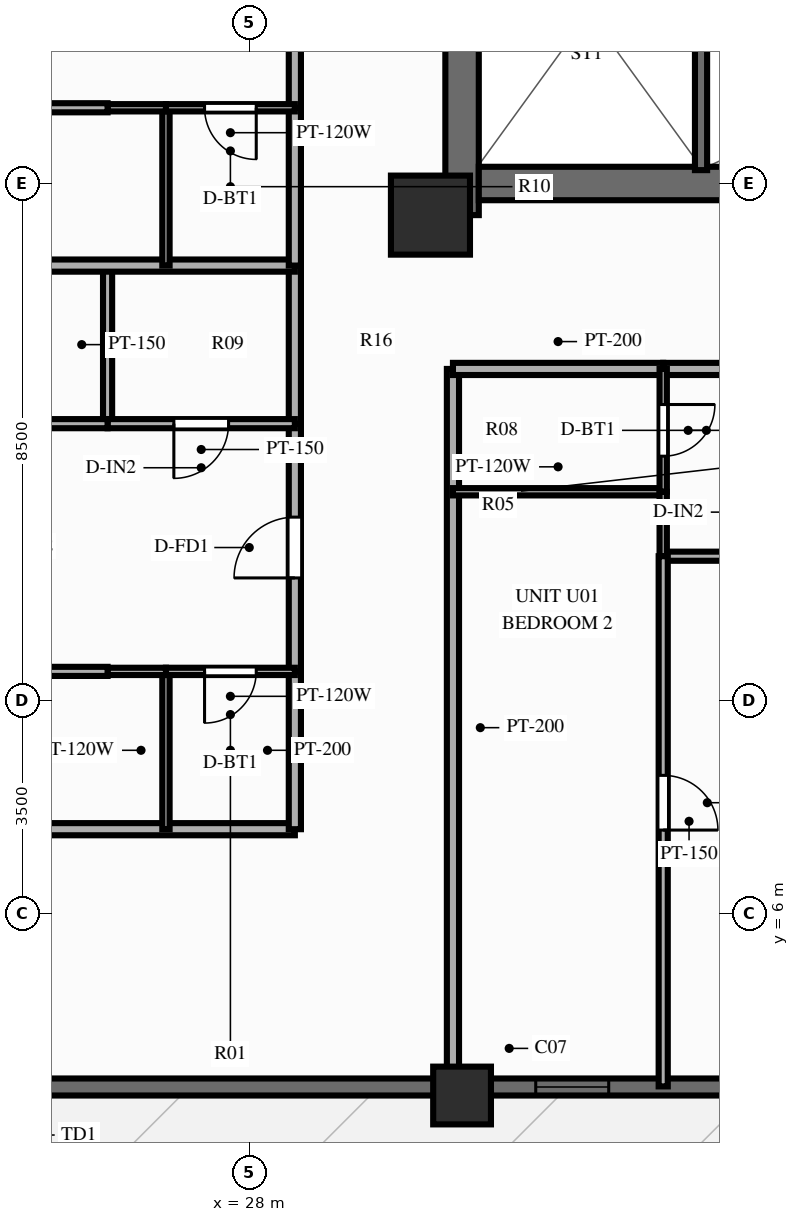
"""IFC4 building model, lengths in metres.
Left out: names, types, materials, properties, quantities, classifications, styles, units other than length and angle.
Written with IfcOpenShell. Run it as: python <this file> out.ifc"""

import sys

from ifc_helpers import new_model, si_unit, direction, frame, frame_2d, origin, origin_2d, place, context, subcontext, project, spatial, rectangle, extrude, source, transform, mapped, element, fill, save


model = new_model("IFC4")
c1 = context("Model", 3, precision=1e-05, world=origin(), true_north=direction((0.0, 1.0)))
c2 = subcontext(c1, "Body", "Model", "MODEL_VIEW")
j1 = project(units=[si_unit("LENGTHUNIT", "METRE"), si_unit("PLANEANGLEUNIT", "RADIAN")], contexts=[c1])
p1 = place(None, origin())
s1 = spatial("IfcSite", under=j1, at=p1, CompositionType="ELEMENT")
p2 = place(p1, origin())
s2 = spatial("IfcBuilding", under=s1, at=p2, CompositionType="ELEMENT")
p3 = place(p2, frame((0.0, 0.0, 116.85)))
s3 = spatial("IfcBuildingStorey", under=s2, at=p3, CompositionType="ELEMENT", Elevation=116.85)
p4 = place(p3, frame((31.5, 17.48, 0.0), z_axis=(0.0, 0.0, 1.0), x_axis=(0.0, 1.0, 0.0)))
e1 = element("IfcWall", 1, at=p4, inside=s3, PredefinedType="SHEAR", context=c2, shape_type="SweptSolid", body=[
    extrude(rectangle(XDim=19.04, YDim=0.55, at=frame_2d((9.52, 0.0))), origin(), (0.0, 0.0, 1.0), 3.0),
])
p5 = place(p4, frame((6.32, 0.0, 0.0)))
e2 = element("IfcOpeningElement", 2, at=p5, cuts=e1, PredefinedType="OPENING", context=c2, shape_type="SweptSolid", body=[
    extrude(rectangle(XDim=1.1, YDim=2.15, at=frame_2d((0.55, 1.075))), frame((0.0, 0.287, 0.0), z_axis=(0.0, -1.0, 0.0), x_axis=(1.0, 0.0, 0.0)), (0.0, 0.0, 1.0), 0.574),
])
p6 = place(p3, frame((31.775, 18.0, 0.0), z_axis=(0.0, 0.0, 1.0), x_axis=(1.0, 0.0, 0.0)))
e3 = element("IfcWall", 3, at=p6, inside=s3, PredefinedType="SHEAR", context=c2, shape_type="SweptSolid", body=[
    extrude(rectangle(XDim=12.45, YDim=0.55, at=frame_2d((6.225, 0.0))), origin(), (0.0, 0.0, 1.0), 3.0),
])
m1 = source(origin(), c2, "Body", "SweptSolid", [
    extrude(rectangle(XDim=1.3, YDim=1.3, at=origin_2d()), origin(), (0.0, 0.0, 1.0), 3.0),
])
p7 = place(p3, frame((30.98, 17.48, 0.0), z_axis=(0.0, 0.0, 1.0), x_axis=(1.0, 0.0, 0.0)))
e4 = element("IfcColumn", 4, at=p7, inside=s3, PredefinedType="COLUMN", context=c2, shape_type="MappedRepresentation", body=[
    mapped(m1, transform((0.0, 0.0, 0.0), scale=1.0)),
])
m2 = source(origin(), c2, "Body", "SweptSolid", [
    extrude(rectangle(XDim=0.95, YDim=0.95, at=origin_2d()), origin(), (0.0, 0.0, 1.0), 3.0),
])
p8 = place(p3, frame((31.5, 3.0, 0.0), z_axis=(0.0, 0.0, 1.0), x_axis=(1.0, 0.0, 0.0)))
e5 = element("IfcColumn", 5, at=p8, inside=s3, PredefinedType="COLUMN", context=c2, shape_type="MappedRepresentation", body=[
    mapped(m2, transform((0.0, 0.0, 0.0), scale=1.0)),
])
p9 = place(p3, frame((16.2, 3.14, 0.0), z_axis=(0.0, 0.0, 1.0), x_axis=(1.0, 0.0, 0.0)))
e6 = element("IfcWall", 6, at=p9, inside=s3, PredefinedType="SOLIDWALL", context=c2, shape_type="SweptSolid", body=[
    extrude(rectangle(XDim=43.6, YDim=0.28, at=frame_2d((21.8, 0.0))), origin(), (0.0, 0.0, 1.0), 2.28),
])
p10 = place(p9, frame((8.2, 0.0, 0.0), z_axis=(0.0, 0.0, 1.0), x_axis=(-1.0, 0.0, 0.0)))
e7 = element("IfcOpeningElement", 7, at=p10, cuts=e6, PredefinedType="OPENING", context=c2, shape_type="SweptSolid", body=[
    extrude(rectangle(XDim=1.1, YDim=2.15, at=frame_2d((0.55, 1.075))), frame((0.0, 0.152, 0.0), z_axis=(0.0, -1.0, 0.0), x_axis=(1.0, 0.0, 0.0)), (0.0, 0.0, 1.0), 0.304),
])
p11 = place(p9, frame((16.511, 0.0, 0.25)))
e8 = element("IfcOpeningElement", 8, at=p11, cuts=e6, PredefinedType="OPENING", context=c2, shape_type="SweptSolid", body=[
    extrude(rectangle(XDim=1.2, YDim=1.5, at=frame_2d((0.6, 0.75))), frame((0.0, 0.152, 0.0), z_axis=(0.0, -1.0, 0.0), x_axis=(1.0, 0.0, 0.0)), (0.0, 0.0, 1.0), 0.304),
])
p12 = place(p9, frame((21.065, 0.0, 0.25)))
e9 = element("IfcOpeningElement", 9, at=p12, cuts=e6, PredefinedType="OPENING", context=c2, shape_type="SweptSolid", body=[
    extrude(rectangle(XDim=1.2, YDim=1.5, at=frame_2d((0.6, 0.75))), frame((0.0, 0.152, 0.0), z_axis=(0.0, -1.0, 0.0), x_axis=(1.0, 0.0, 0.0)), (0.0, 0.0, 1.0), 0.304),
])
p13 = place(p9, frame((25.754, 0.0, 0.25)))
e10 = element("IfcOpeningElement", 10, at=p13, cuts=e6, PredefinedType="OPENING", context=c2, shape_type="SweptSolid", body=[
    extrude(rectangle(XDim=1.2, YDim=1.5, at=frame_2d((0.6, 0.75))), frame((0.0, 0.152, 0.0), z_axis=(0.0, -1.0, 0.0), x_axis=(1.0, 0.0, 0.0)), (0.0, 0.0, 1.0), 0.304),
])
p14 = place(p9, frame((35.35, 0.0, 0.25)))
e11 = element("IfcOpeningElement", 11, at=p14, cuts=e6, PredefinedType="OPENING", context=c2, shape_type="SweptSolid", body=[
    extrude(rectangle(XDim=1.2, YDim=1.5, at=frame_2d((0.6, 0.75))), frame((0.0, 0.152, 0.0), z_axis=(0.0, -1.0, 0.0), x_axis=(1.0, 0.0, 0.0)), (0.0, 0.0, 1.0), 0.304),
])
p15 = place(p3, frame((35.43, 18.22, 0.0), z_axis=(0.0, 0.0, 1.0), x_axis=(0.0, 1.0, 0.0)))
e12 = element("IfcWall", 12, at=p15, inside=s3, PredefinedType="SOLIDWALL", context=c2, shape_type="SweptSolid", body=[
    extrude(rectangle(XDim=7.22, YDim=0.2, at=frame_2d((3.61, 0.0))), origin(), (0.0, 0.0, 1.0), 2.79),
])
p16 = place(p15, frame((6.68, 0.0, 0.0), z_axis=(0.0, 0.0, 1.0), x_axis=(-1.0, 0.0, 0.0)))
e13 = element("IfcOpeningElement", 13, at=p16, cuts=e12, PredefinedType="OPENING", context=c2, shape_type="SweptSolid", body=[
    extrude(rectangle(XDim=1.1, YDim=2.15, at=frame_2d((0.55, 1.075))), frame((0.0, 0.112, 0.0), z_axis=(0.0, -1.0, 0.0), x_axis=(1.0, 0.0, 0.0)), (0.0, 0.0, 1.0), 0.224),
])
p17 = place(p3, frame((31.35, 14.95, 0.0), z_axis=(0.0, 0.0, 1.0), x_axis=(0.0, -1.0, 0.0)))
e14 = element("IfcWall", 14, at=p17, inside=s3, PredefinedType="PARTITIONING", context=c2, shape_type="SweptSolid", body=[
    extrude(rectangle(XDim=11.8, YDim=0.2, at=frame_2d((5.9, 0.0))), origin(), (0.0, 0.0, 1.0), 2.34),
])
p18 = place(p3, frame((31.35, 14.95, 0.0), z_axis=(0.0, 0.0, 1.0), x_axis=(1.0, 0.0, 0.0)))
e15 = element("IfcWall", 15, at=p18, inside=s3, PredefinedType="PARTITIONING", context=c2, shape_type="SweptSolid", body=[
    extrude(rectangle(XDim=3.458, YDim=0.2, at=frame_2d((1.729, 0.0))), origin(), (0.0, 0.0, 1.0), 2.79),
])
p19 = place(p3, frame((34.808, 14.95, 0.0), z_axis=(0.0, 0.0, 1.0), x_axis=(1.0, 0.0, 0.0)))
e16 = element("IfcWall", 16, at=p19, inside=s3, PredefinedType="PARTITIONING", context=c2, shape_type="SweptSolid", body=[
    extrude(rectangle(XDim=3.465, YDim=0.2, at=frame_2d((1.732, 0.0))), origin(), (0.0, 0.0, 1.0), 2.79),
])
p20 = place(p19, frame((1.232, 0.0, 0.0)))
e17 = element("IfcOpeningElement", 17, at=p20, cuts=e16, PredefinedType="OPENING", context=c2, shape_type="SweptSolid", body=[
    extrude(rectangle(XDim=1.0, YDim=2.15, at=frame_2d((0.5, 1.075))), frame((0.0, 0.112, 0.0), z_axis=(0.0, -1.0, 0.0), x_axis=(1.0, 0.0, 0.0)), (0.0, 0.0, 1.0), 0.224),
])
p21 = place(p3, frame((34.808, 11.87, 0.0), z_axis=(0.0, 0.0, 1.0), x_axis=(1.0, 0.0, 0.0)))
e18 = element("IfcWall", 18, at=p21, inside=s3, PredefinedType="PARTITIONING", context=c2, shape_type="SweptSolid", body=[
    extrude(rectangle(XDim=3.465, YDim=0.15, at=frame_2d((1.732, 0.0))), origin(), (0.0, 0.0, 1.0), 2.79),
])
p22 = place(p21, frame((1.282, 0.0, 0.0)))
e19 = element("IfcOpeningElement", 19, at=p22, cuts=e18, PredefinedType="OPENING", context=c2, shape_type="SweptSolid", body=[
    extrude(rectangle(XDim=0.9, YDim=2.1, at=frame_2d((0.45, 1.05))), frame((0.0, 0.087, 0.0), z_axis=(0.0, -1.0, 0.0), x_axis=(1.0, 0.0, 0.0)), (0.0, 0.0, 1.0), 0.174),
])
p23 = place(p3, frame((31.35, 12.93, 0.0), z_axis=(0.0, 0.0, 1.0), x_axis=(1.0, 0.0, 0.0)))
e20 = element("IfcWall", 20, at=p23, inside=s3, PredefinedType="PARTITIONING", context=c2, shape_type="SweptSolid", body=[
    extrude(rectangle(XDim=3.458, YDim=0.12, at=frame_2d((1.729, 0.0))), origin(), (0.0, 0.0, 1.0), 2.79),
])
p24 = place(p3, frame((34.808, 14.95, 0.0), z_axis=(0.0, 0.0, 1.0), x_axis=(0.0, -1.0, 0.0)))
e21 = element("IfcWall", 21, at=p24, inside=s3, PredefinedType="PARTITIONING", context=c2, shape_type="SweptSolid", body=[
    extrude(rectangle(XDim=2.02, YDim=0.12, at=frame_2d((1.01, 0.0))), origin(), (0.0, 0.0, 1.0), 2.79),
])
p25 = place(p24, frame((0.585, 0.0, 0.0)))
e22 = element("IfcOpeningElement", 22, at=p25, cuts=e21, PredefinedType="OPENING", context=c2, shape_type="SweptSolid", body=[
    extrude(rectangle(XDim=0.85, YDim=2.05, at=frame_2d((0.425, 1.025))), frame((0.0, 0.072, 0.0), z_axis=(0.0, -1.0, 0.0), x_axis=(1.0, 0.0, 0.0)), (0.0, 0.0, 1.0), 0.144),
])
p26 = place(p3, frame((34.808, 12.93, 0.0), z_axis=(0.0, 0.0, 1.0), x_axis=(0.0, -1.0, 0.0)))
e23 = element("IfcWall", 23, at=p26, inside=s3, PredefinedType="PARTITIONING", context=c2, shape_type="SweptSolid", body=[
    extrude(rectangle(XDim=1.06, YDim=0.12, at=frame_2d((0.53, 0.0))), origin(), (0.0, 0.0, 1.0), 2.79),
])
p27 = place(p3, frame((34.808, 11.87, 0.0), z_axis=(0.0, 0.0, 1.0), x_axis=(0.0, -1.0, 0.0)))
e24 = element("IfcWall", 24, at=p27, inside=s3, PredefinedType="PARTITIONING", context=c2, shape_type="SweptSolid", body=[
    extrude(rectangle(XDim=8.72, YDim=0.15, at=frame_2d((4.36, 0.0))), origin(), (0.0, 0.0, 1.0), 2.79),
])
p28 = place(p27, frame((3.604, 0.0, 0.0)))
e25 = element("IfcOpeningElement", 25, at=p28, cuts=e24, PredefinedType="OPENING", context=c2, shape_type="SweptSolid", body=[
    extrude(rectangle(XDim=0.9, YDim=2.1, at=frame_2d((0.45, 1.05))), frame((0.0, 0.087, 0.0), z_axis=(0.0, -1.0, 0.0), x_axis=(1.0, 0.0, 0.0)), (0.0, 0.0, 1.0), 0.174),
])
p29 = place(p3, frame((28.75, 7.38, 0.0), z_axis=(0.0, 0.0, 1.0), x_axis=(-1.0, 0.0, 0.0)))
e26 = element("IfcWall", 26, at=p29, inside=s3, PredefinedType="PARTITIONING", context=c2, shape_type="SweptSolid", body=[
    extrude(rectangle(XDim=16.6, YDim=0.2, at=frame_2d((8.3, 0.0))), origin(), (0.0, 0.0, 1.0), 2.79),
])
p30 = place(p3, frame((28.75, 7.38, 0.0), z_axis=(0.0, 0.0, 1.0), x_axis=(0.0, 1.0, 0.0)))
e27 = element("IfcWall", 27, at=p30, inside=s3, PredefinedType="PARTITIONING", context=c2, shape_type="SweptSolid", body=[
    extrude(rectangle(XDim=2.596, YDim=0.2, at=frame_2d((1.298, 0.0))), origin(), (0.0, 0.0, 1.0), 2.79),
])
p31 = place(p3, frame((28.75, 9.976, 0.0), z_axis=(0.0, 0.0, 1.0), x_axis=(0.0, 1.0, 0.0)))
e28 = element("IfcWall", 28, at=p31, inside=s3, PredefinedType="PARTITIONING", context=c2, shape_type="SweptSolid", body=[
    extrude(rectangle(XDim=4.074, YDim=0.2, at=frame_2d((2.037, 0.0))), origin(), (0.0, 0.0, 1.0), 2.79),
])
p32 = place(p31, frame((1.537, 0.0, 0.0)))
e29 = element("IfcOpeningElement", 29, at=p32, cuts=e28, PredefinedType="OPENING", context=c2, shape_type="SweptSolid", body=[
    extrude(rectangle(XDim=1.0, YDim=2.15, at=frame_2d((0.5, 1.075))), frame((0.0, 0.112, 0.0), z_axis=(0.0, -1.0, 0.0), x_axis=(1.0, 0.0, 0.0)), (0.0, 0.0, 1.0), 0.224),
])
p33 = place(p3, frame((28.75, 14.05, 0.0), z_axis=(0.0, 0.0, 1.0), x_axis=(0.0, 1.0, 0.0)))
e30 = element("IfcWall", 30, at=p33, inside=s3, PredefinedType="PARTITIONING", context=c2, shape_type="SweptSolid", body=[
    extrude(rectangle(XDim=2.6, YDim=0.2, at=frame_2d((1.3, 0.0))), origin(), (0.0, 0.0, 1.0), 2.79),
])
p34 = place(p3, frame((26.63, 7.38, 0.0), z_axis=(0.0, 0.0, 1.0), x_axis=(0.0, 1.0, 0.0)))
e31 = element("IfcWall", 31, at=p34, inside=s3, PredefinedType="PARTITIONING", context=c2, shape_type="SweptSolid", body=[
    extrude(rectangle(XDim=2.596, YDim=0.12, at=frame_2d((1.298, 0.0))), origin(), (0.0, 0.0, 1.0), 2.79),
])
p35 = place(p3, frame((25.67, 14.05, 0.0), z_axis=(0.0, 0.0, 1.0), x_axis=(0.0, 1.0, 0.0)))
e32 = element("IfcWall", 32, at=p35, inside=s3, PredefinedType="PARTITIONING", context=c2, shape_type="SweptSolid", body=[
    extrude(rectangle(XDim=2.6, YDim=0.15, at=frame_2d((1.3, 0.0))), origin(), (0.0, 0.0, 1.0), 2.79),
])
p36 = place(p3, frame((28.75, 9.976, 0.0), z_axis=(0.0, 0.0, 1.0), x_axis=(-1.0, 0.0, 0.0)))
e33 = element("IfcWall", 33, at=p36, inside=s3, PredefinedType="PARTITIONING", context=c2, shape_type="SweptSolid", body=[
    extrude(rectangle(XDim=2.12, YDim=0.12, at=frame_2d((1.06, 0.0))), origin(), (0.0, 0.0, 1.0), 2.79),
])
p37 = place(p36, frame((0.635, 0.0, 0.0)))
e34 = element("IfcOpeningElement", 34, at=p37, cuts=e33, PredefinedType="OPENING", context=c2, shape_type="SweptSolid", body=[
    extrude(rectangle(XDim=0.85, YDim=2.05, at=frame_2d((0.425, 1.025))), frame((0.0, 0.072, 0.0), z_axis=(0.0, -1.0, 0.0), x_axis=(1.0, 0.0, 0.0)), (0.0, 0.0, 1.0), 0.144),
])
p38 = place(p3, frame((26.63, 9.976, 0.0), z_axis=(0.0, 0.0, 1.0), x_axis=(-1.0, 0.0, 0.0)))
e35 = element("IfcWall", 35, at=p38, inside=s3, PredefinedType="PARTITIONING", context=c2, shape_type="SweptSolid", body=[
    extrude(rectangle(XDim=0.96, YDim=0.12, at=frame_2d((0.48, 0.0))), origin(), (0.0, 0.0, 1.0), 2.79),
])
p39 = place(p3, frame((25.67, 9.976, 0.0), z_axis=(0.0, 0.0, 1.0), x_axis=(-1.0, 0.0, 0.0)))
e36 = element("IfcWall", 36, at=p39, inside=s3, PredefinedType="PARTITIONING", context=c2, shape_type="SweptSolid", body=[
    extrude(rectangle(XDim=13.52, YDim=0.15, at=frame_2d((6.76, 0.0))), origin(), (0.0, 0.0, 1.0), 2.79),
])
p40 = place(p39, frame((5.804, 0.0, 0.0)))
e37 = element("IfcOpeningElement", 37, at=p40, cuts=e36, PredefinedType="OPENING", context=c2, shape_type="SweptSolid", body=[
    extrude(rectangle(XDim=0.9, YDim=2.1, at=frame_2d((0.45, 1.05))), frame((0.0, 0.087, 0.0), z_axis=(0.0, -1.0, 0.0), x_axis=(1.0, 0.0, 0.0)), (0.0, 0.0, 1.0), 0.174),
])
p41 = place(p3, frame((28.75, 14.05, 0.0), z_axis=(0.0, 0.0, 1.0), x_axis=(-1.0, 0.0, 0.0)))
e38 = element("IfcWall", 38, at=p41, inside=s3, PredefinedType="PARTITIONING", context=c2, shape_type="SweptSolid", body=[
    extrude(rectangle(XDim=3.08, YDim=0.15, at=frame_2d((1.54, 0.0))), origin(), (0.0, 0.0, 1.0), 2.79),
])
p42 = place(p41, frame((1.09, 0.0, 0.0)))
e39 = element("IfcOpeningElement", 39, at=p42, cuts=e38, PredefinedType="OPENING", context=c2, shape_type="SweptSolid", body=[
    extrude(rectangle(XDim=0.9, YDim=2.1, at=frame_2d((0.45, 1.05))), frame((0.0, 0.087, 0.0), z_axis=(0.0, -1.0, 0.0), x_axis=(1.0, 0.0, 0.0)), (0.0, 0.0, 1.0), 0.174),
])
p43 = place(p3, frame((25.67, 14.05, 0.0), z_axis=(0.0, 0.0, 1.0), x_axis=(-1.0, 0.0, 0.0)))
e40 = element("IfcWall", 40, at=p43, inside=s3, PredefinedType="PARTITIONING", context=c2, shape_type="SweptSolid", body=[
    extrude(rectangle(XDim=13.52, YDim=0.15, at=frame_2d((6.76, 0.0))), origin(), (0.0, 0.0, 1.0), 2.79),
])
p44 = place(p43, frame((5.804, 0.0, 0.0)))
e41 = element("IfcOpeningElement", 41, at=p44, cuts=e40, PredefinedType="OPENING", context=c2, shape_type="SweptSolid", body=[
    extrude(rectangle(XDim=0.9, YDim=2.1, at=frame_2d((0.45, 1.05))), frame((0.0, 0.087, 0.0), z_axis=(0.0, -1.0, 0.0), x_axis=(1.0, 0.0, 0.0)), (0.0, 0.0, 1.0), 0.174),
])
p45 = place(p3, frame((28.75, 16.65, 0.0), z_axis=(0.0, 0.0, 1.0), x_axis=(-1.0, 0.0, 0.0)))
e42 = element("IfcWall", 42, at=p45, inside=s3, PredefinedType="PARTITIONING", context=c2, shape_type="SweptSolid", body=[
    extrude(rectangle(XDim=16.6, YDim=0.2, at=frame_2d((8.3, 0.0))), origin(), (0.0, 0.0, 1.0), 2.79),
])
p46 = place(p3, frame((28.75, 16.65, 0.0), z_axis=(0.0, 0.0, 1.0), x_axis=(0.0, 1.0, 0.0)))
e43 = element("IfcWall", 43, at=p46, inside=s3, PredefinedType="PARTITIONING", context=c2, shape_type="SweptSolid", body=[
    extrude(rectangle(XDim=2.596, YDim=0.2, at=frame_2d((1.298, 0.0))), origin(), (0.0, 0.0, 1.0), 2.79),
])
p47 = place(p3, frame((28.75, 19.246, 0.0), z_axis=(0.0, 0.0, 1.0), x_axis=(0.0, 1.0, 0.0)))
e44 = element("IfcWall", 44, at=p47, inside=s3, PredefinedType="PARTITIONING", context=c2, shape_type="SweptSolid", body=[
    extrude(rectangle(XDim=4.074, YDim=0.2, at=frame_2d((2.037, 0.0))), origin(), (0.0, 0.0, 1.0), 2.79),
])
p48 = place(p47, frame((1.537, 0.0, 0.0)))
e45 = element("IfcOpeningElement", 45, at=p48, cuts=e44, PredefinedType="OPENING", context=c2, shape_type="SweptSolid", body=[
    extrude(rectangle(XDim=1.0, YDim=2.15, at=frame_2d((0.5, 1.075))), frame((0.0, 0.112, 0.0), z_axis=(0.0, -1.0, 0.0), x_axis=(1.0, 0.0, 0.0)), (0.0, 0.0, 1.0), 0.224),
])
p49 = place(p3, frame((26.63, 16.65, 0.0), z_axis=(0.0, 0.0, 1.0), x_axis=(0.0, 1.0, 0.0)))
e46 = element("IfcWall", 46, at=p49, inside=s3, PredefinedType="PARTITIONING", context=c2, shape_type="SweptSolid", body=[
    extrude(rectangle(XDim=2.596, YDim=0.12, at=frame_2d((1.298, 0.0))), origin(), (0.0, 0.0, 1.0), 2.79),
])
p50 = place(p3, frame((28.75, 19.246, 0.0), z_axis=(0.0, 0.0, 1.0), x_axis=(-1.0, 0.0, 0.0)))
e47 = element("IfcWall", 47, at=p50, inside=s3, PredefinedType="PARTITIONING", context=c2, shape_type="SweptSolid", body=[
    extrude(rectangle(XDim=2.12, YDim=0.12, at=frame_2d((1.06, 0.0))), origin(), (0.0, 0.0, 1.0), 2.79),
])
p51 = place(p50, frame((0.635, 0.0, 0.0)))
e48 = element("IfcOpeningElement", 48, at=p51, cuts=e47, PredefinedType="OPENING", context=c2, shape_type="SweptSolid", body=[
    extrude(rectangle(XDim=0.85, YDim=2.05, at=frame_2d((0.425, 1.025))), frame((0.0, 0.072, 0.0), z_axis=(0.0, -1.0, 0.0), x_axis=(1.0, 0.0, 0.0)), (0.0, 0.0, 1.0), 0.144),
])
p52 = place(p3, frame((26.63, 19.246, 0.0), z_axis=(0.0, 0.0, 1.0), x_axis=(-1.0, 0.0, 0.0)))
e49 = element("IfcWall", 49, at=p52, inside=s3, PredefinedType="PARTITIONING", context=c2, shape_type="SweptSolid", body=[
    extrude(rectangle(XDim=0.96, YDim=0.12, at=frame_2d((0.48, 0.0))), origin(), (0.0, 0.0, 1.0), 2.79),
])
p53 = place(p3, frame((25.67, 19.246, 0.0), z_axis=(0.0, 0.0, 1.0), x_axis=(-1.0, 0.0, 0.0)))
e50 = element("IfcWall", 50, at=p53, inside=s3, PredefinedType="PARTITIONING", context=c2, shape_type="SweptSolid", body=[
    extrude(rectangle(XDim=13.52, YDim=0.15, at=frame_2d((6.76, 0.0))), origin(), (0.0, 0.0, 1.0), 2.79),
])
p54 = place(p53, frame((5.804, 0.0, 0.0)))
e51 = element("IfcOpeningElement", 51, at=p54, cuts=e50, PredefinedType="OPENING", context=c2, shape_type="SweptSolid", body=[
    extrude(rectangle(XDim=0.9, YDim=2.1, at=frame_2d((0.45, 1.05))), frame((0.0, 0.087, 0.0), z_axis=(0.0, -1.0, 0.0), x_axis=(1.0, 0.0, 0.0)), (0.0, 0.0, 1.0), 0.174),
])
m3 = source(origin(), c2, "Body", "SweptSolid", [
    extrude(rectangle(XDim=1.2, YDim=1.5, at=frame_2d((0.6, 0.75))), frame((0.0, 0.03, 0.0), z_axis=(0.0, -1.0, 0.0), x_axis=(1.0, 0.0, 0.0)), (0.0, 0.0, 1.0), 0.06),
])
p55 = place(p11, origin())
e52 = element("IfcWindow", 52, at=p55, inside=s3, PartitioningType="SINGLE_PANEL", PredefinedType="WINDOW", context=c2, shape_type="MappedRepresentation", body=[
    mapped(m3, transform((0.0, 0.0, 0.0), scale=1.0)),
])
fill(e8, e52)
m4 = source(origin(), c2, "Body", "SweptSolid", [
    extrude(rectangle(XDim=0.85, YDim=2.05, at=frame_2d((0.425, 1.025))), frame((0.0, 0.025, 0.0), z_axis=(0.0, -1.0, 0.0), x_axis=(1.0, 0.0, 0.0)), (0.0, 0.0, 1.0), 0.05),
])
p56 = place(p25, origin())
e53 = element("IfcDoor", 53, at=p56, inside=s3, OperationType="SINGLE_SWING_LEFT", PredefinedType="DOOR", context=c2, shape_type="MappedRepresentation", body=[
    mapped(m4, transform((0.0, 0.0, 0.0), scale=1.0)),
])
fill(e22, e53)
m5 = source(origin(), c2, "Body", "SweptSolid", [
    extrude(rectangle(XDim=0.9, YDim=2.1, at=frame_2d((0.45, 1.05))), frame((0.0, 0.025, 0.0), z_axis=(0.0, -1.0, 0.0), x_axis=(1.0, 0.0, 0.0)), (0.0, 0.0, 1.0), 0.05),
])
p57 = place(p28, origin())
e54 = element("IfcDoor", 54, at=p57, inside=s3, OperationType="SINGLE_SWING_RIGHT", PredefinedType="DOOR", context=c2, shape_type="MappedRepresentation", body=[
    mapped(m5, transform((0.0, 0.0, 0.0), scale=1.0)),
])
fill(e25, e54)
m6 = source(origin(), c2, "Body", "SweptSolid", [
    extrude(rectangle(XDim=1.0, YDim=2.15, at=frame_2d((0.5, 1.075))), frame((0.0, 0.025, 0.0), z_axis=(0.0, -1.0, 0.0), x_axis=(1.0, 0.0, 0.0)), (0.0, 0.0, 1.0), 0.05),
])
p58 = place(p32, origin())
e55 = element("IfcDoor", 55, at=p58, inside=s3, OperationType="SINGLE_SWING_LEFT", PredefinedType="DOOR", context=c2, shape_type="MappedRepresentation", body=[
    mapped(m6, transform((0.0, 0.0, 0.0), scale=1.0)),
])
fill(e29, e55)
p59 = place(p37, origin())
e56 = element("IfcDoor", 56, at=p59, inside=s3, OperationType="SINGLE_SWING_RIGHT", PredefinedType="DOOR", context=c2, shape_type="MappedRepresentation", body=[
    mapped(m4, transform((0.0, 0.0, 0.0), scale=1.0)),
])
fill(e34, e56)
p60 = place(p42, origin())
e57 = element("IfcDoor", 57, at=p60, inside=s3, OperationType="SINGLE_SWING_RIGHT", PredefinedType="DOOR", context=c2, shape_type="MappedRepresentation", body=[
    mapped(m5, transform((0.0, 0.0, 0.0), scale=1.0)),
])
fill(e39, e57)
p61 = place(p51, origin())
e58 = element("IfcDoor", 58, at=p61, inside=s3, OperationType="SINGLE_SWING_LEFT", PredefinedType="DOOR", context=c2, shape_type="MappedRepresentation", body=[
    mapped(m4, transform((0.0, 0.0, 0.0), scale=1.0)),
])
fill(e48, e58)
save(model, sys.argv[1])
